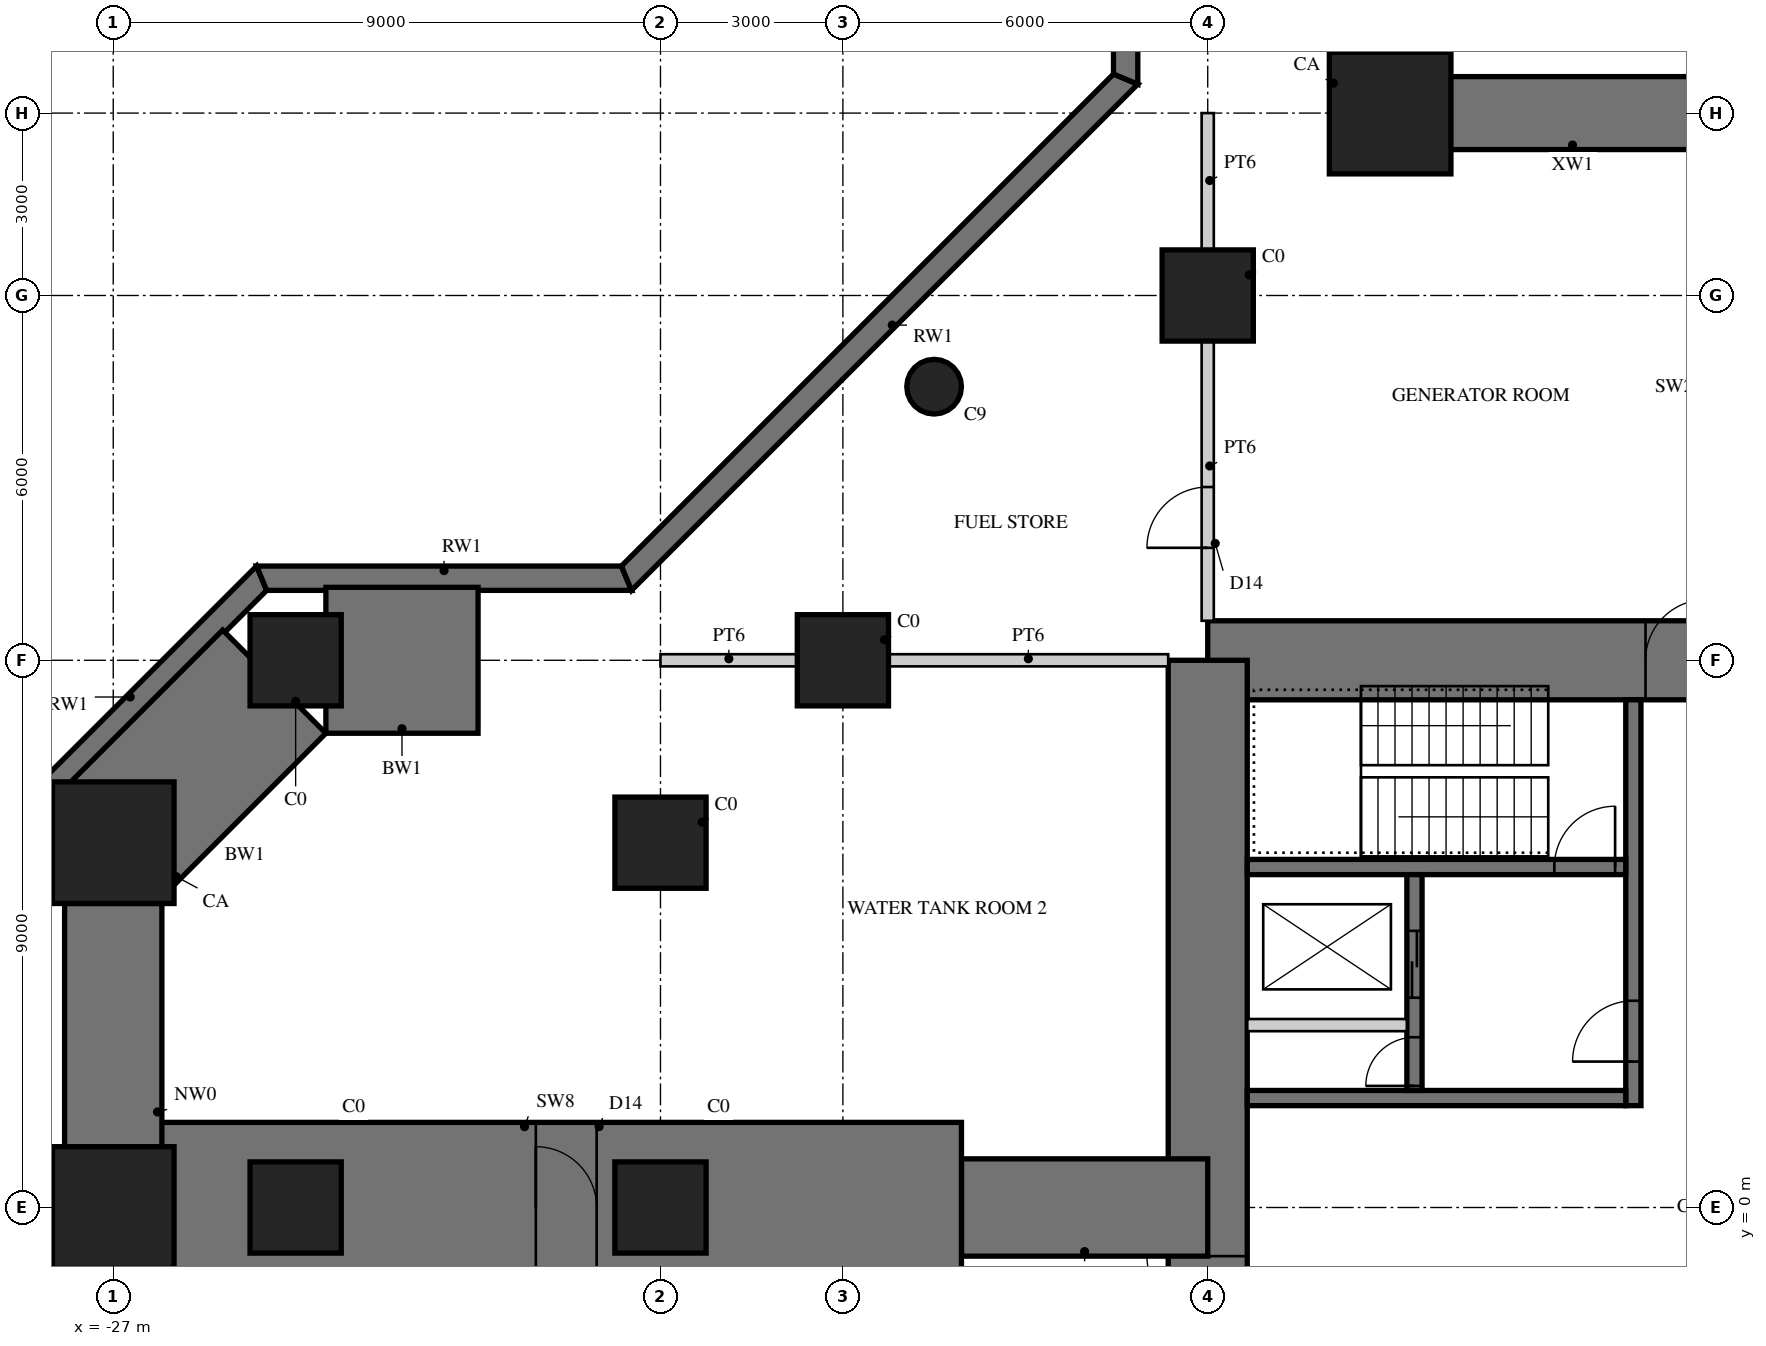
"""IFC4 building model, lengths in metres.
Left out: names, types, materials, properties, quantities, classifications, styles, units other than length and angle.
Written with IfcOpenShell. Run it as: python <this file> out.ifc"""

import sys

from ifc_helpers import new_model, si_unit, direction, frame, frame_2d, origin, origin_2d, place, context, subcontext, project, spatial, polyline, rectangle, circle, outline, extrude, element, fill, save


model = new_model("IFC4")
c1 = context("Model", 3, precision=1e-05, world=origin(), true_north=direction((0.0, 1.0)))
c2 = subcontext(c1, "Body", "Model", "MODEL_VIEW")
j1 = project(units=[si_unit("LENGTHUNIT", "METRE"), si_unit("PLANEANGLEUNIT", "RADIAN")], contexts=[c1])
p1 = place(None, origin())
s1 = spatial("IfcSite", under=j1, at=p1, CompositionType="ELEMENT")
p2 = place(p1, origin())
s2 = spatial("IfcBuilding", under=s1, at=p2, CompositionType="ELEMENT")
p3 = place(p2, frame((0.0, 0.0, -8.0)))
s3 = spatial("IfcBuildingStorey", under=s2, at=p3, CompositionType="ELEMENT", Elevation=-8.0)
p4 = place(p3, origin())
e1 = element("IfcWall", 1, at=p4, inside=s3, PredefinedType="SOLIDWALL", context=c2, shape_type="SweptSolid", body=[
    extrude(outline(polyline([(-28.15, 6.476), (-28.55, 6.642), (-24.642, 10.55), (-24.476, 10.15), (-28.15, 6.476)])), origin(), (0.0, 0.0, 1.0), 4.0),
])
p5 = place(p3, origin())
e2 = element("IfcWall", 2, at=p5, inside=s3, PredefinedType="SOLIDWALL", context=c2, shape_type="SweptSolid", body=[
    extrude(outline(polyline([(-24.476, 10.15), (-24.642, 10.55), (-18.642, 10.55), (-18.476, 10.15), (-24.476, 10.15)])), origin(), (0.0, 0.0, 1.0), 4.0),
])
p6 = place(p3, origin())
e3 = element("IfcWall", 3, at=p6, inside=s3, PredefinedType="SOLIDWALL", context=c2, shape_type="SweptSolid", body=[
    extrude(outline(polyline([(-18.476, 10.15), (-18.642, 10.55), (-10.55, 18.642), (-10.15, 18.476), (-18.476, 10.15)])), origin(), (0.0, 0.0, 1.0), 4.0),
])
p7 = place(p3, origin())
e4 = element("IfcWall", 4, at=p7, inside=s3, PredefinedType="SOLIDWALL", context=c2, shape_type="SweptSolid", body=[
    extrude(outline(polyline([(-10.15, 18.476), (-10.55, 18.642), (-10.55, 24.642), (-10.15, 24.476), (-10.15, 18.476)])), origin(), (0.0, 0.0, 1.0), 4.0),
])
p8 = place(p3, frame((9.0, 9.0, 0.0), z_axis=(0.0, 0.0, 1.0), x_axis=(-1.0, 0.0, 0.0)))
e5 = element("IfcWall", 5, at=p8, inside=s3, PredefinedType="SHEAR", context=c2, shape_type="SweptSolid", body=[
    extrude(rectangle(XDim=18.0, YDim=1.3, at=frame_2d((9.0, 0.0))), origin(), (0.0, 0.0, 1.0), 4.0),
])
p9 = place(p8, frame((9.8, 0.0, 0.0)))
e6 = element("IfcOpeningElement", 6, at=p9, cuts=e5, PredefinedType="OPENING", context=c2, shape_type="SweptSolid", body=[
    extrude(rectangle(XDim=1.0, YDim=2.4, at=frame_2d((0.5, 1.2))), frame((0.0, 0.66, 0.0), z_axis=(0.0, -1.0, 0.0), x_axis=(1.0, 0.0, 0.0)), (0.0, 0.0, 1.0), 1.32),
])
p10 = place(p3, frame((-9.0, 9.0, 0.0), z_axis=(0.0, 0.0, 1.0), x_axis=(0.0, -1.0, 0.0)))
e7 = element("IfcWall", 7, at=p10, inside=s3, PredefinedType="SHEAR", context=c2, shape_type="SweptSolid", body=[
    extrude(rectangle(XDim=18.0, YDim=1.3, at=frame_2d((9.0, 0.0))), origin(), (0.0, 0.0, 1.0), 4.0),
])
p11 = place(p10, frame((9.8, 0.0, 0.0)))
e8 = element("IfcOpeningElement", 8, at=p11, cuts=e7, PredefinedType="OPENING", context=c2, shape_type="SweptSolid", body=[
    extrude(rectangle(XDim=1.0, YDim=2.4, at=frame_2d((0.5, 1.2))), frame((0.0, 0.66, 0.0), z_axis=(0.0, -1.0, 0.0), x_axis=(1.0, 0.0, 0.0)), (0.0, 0.0, 1.0), 1.32),
])
p12 = place(p3, frame((-2.0, 1.675, 0.0), z_axis=(0.0, 0.0, 1.0), x_axis=(0.0, 1.0, 0.0)))
e9 = element("IfcWall", 9, at=p12, inside=s3, PredefinedType="SHEAR", context=c2, shape_type="SweptSolid", body=[
    extrude(rectangle(XDim=6.675, YDim=0.25, at=frame_2d((3.337, 0.0))), origin(), (0.0, 0.0, 1.0), 4.0),
])
p13 = place(p12, frame((0.725, 0.0, 0.0)))
e10 = element("IfcOpeningElement", 10, at=p13, cuts=e9, PredefinedType="OPENING", context=c2, shape_type="SweptSolid", body=[
    extrude(rectangle(XDim=1.0, YDim=2.1, at=frame_2d((0.5, 1.05))), frame((0.0, 0.135, 0.0), z_axis=(0.0, -1.0, 0.0), x_axis=(1.0, 0.0, 0.0)), (0.0, 0.0, 1.0), 0.27),
])
p14 = place(p3, frame((-2.125, 1.8, 0.0), z_axis=(0.0, 0.0, 1.0), x_axis=(-1.0, 0.0, 0.0)))
e11 = element("IfcWall", 11, at=p14, inside=s3, PredefinedType="SHEAR", context=c2, shape_type="SweptSolid", body=[
    extrude(rectangle(XDim=6.225, YDim=0.25, at=frame_2d((3.113, 0.0))), origin(), (0.0, 0.0, 1.0), 4.0),
])
p15 = place(p3, frame((-2.125, 5.6, 0.0), z_axis=(0.0, 0.0, 1.0), x_axis=(-1.0, 0.0, 0.0)))
e12 = element("IfcWall", 12, at=p15, inside=s3, PredefinedType="SHEAR", context=c2, shape_type="SweptSolid", body=[
    extrude(rectangle(XDim=6.225, YDim=0.25, at=frame_2d((3.113, 0.0))), origin(), (0.0, 0.0, 1.0), 4.0),
])
p16 = place(p15, frame((0.175, 0.0, 0.0)))
e13 = element("IfcOpeningElement", 13, at=p16, cuts=e12, PredefinedType="OPENING", context=c2, shape_type="SweptSolid", body=[
    extrude(rectangle(XDim=1.0, YDim=2.1, at=frame_2d((0.5, 1.05))), frame((0.0, 0.135, 0.0), z_axis=(0.0, -1.0, 0.0), x_axis=(1.0, 0.0, 0.0)), (0.0, 0.0, 1.0), 0.27),
])
p17 = place(p3, frame((-5.6, 1.925, 0.0), z_axis=(0.0, 0.0, 1.0), x_axis=(0.0, 1.0, 0.0)))
e14 = element("IfcWall", 14, at=p17, inside=s3, PredefinedType="SHEAR", context=c2, shape_type="SweptSolid", body=[
    extrude(rectangle(XDim=3.55, YDim=0.25, at=frame_2d((1.775, 0.0))), origin(), (0.0, 0.0, 1.0), 4.0),
])
p18 = place(p17, frame((1.525, 0.0, 0.0)))
e15 = element("IfcOpeningElement", 15, at=p18, cuts=e14, PredefinedType="OPENING", context=c2, shape_type="SweptSolid", body=[
    extrude(rectangle(XDim=1.1, YDim=2.2, at=frame_2d((0.55, 1.1))), frame((0.0, 0.135, 0.0), z_axis=(0.0, -1.0, 0.0), x_axis=(1.0, 0.0, 0.0)), (0.0, 0.0, 1.0), 0.27),
])
p19 = place(p17, frame((0.075, 0.0, 0.0)))
e16 = element("IfcOpeningElement", 16, at=p19, cuts=e14, PredefinedType="OPENING", context=c2, shape_type="SweptSolid", body=[
    extrude(rectangle(XDim=0.8, YDim=2.1, at=frame_2d((0.4, 1.05))), frame((0.0, 0.135, 0.0), z_axis=(0.0, -1.0, 0.0), x_axis=(1.0, 0.0, 0.0)), (0.0, 0.0, 1.0), 0.27),
])
p20 = place(p3, frame((-5.725, 3.0, 0.0), z_axis=(0.0, 0.0, 1.0), x_axis=(-1.0, 0.0, 0.0)))
e17 = element("IfcWall", 17, at=p20, inside=s3, PredefinedType="PARTITIONING", context=c2, shape_type="SweptSolid", body=[
    extrude(rectangle(XDim=2.625, YDim=0.2, at=frame_2d((1.312, 0.0))), origin(), (0.0, 0.0, 1.0), 4.0),
])
p21 = place(p3, frame((0.0, 18.0, 0.0), z_axis=(0.0, 0.0, 1.0), x_axis=(-1.0, 0.0, 0.0)))
e18 = element("IfcWall", 18, at=p21, inside=s3, PredefinedType="SHEAR", context=c2, shape_type="SweptSolid", body=[
    extrude(rectangle(XDim=6.0, YDim=1.2, at=frame_2d((3.0, 0.0))), origin(), (0.0, 0.0, 1.0), 4.0),
])
p22 = place(p3, frame((-9.0, 0.0, 0.0), z_axis=(0.0, 0.0, 1.0), x_axis=(-1.0, 0.0, 0.0)))
e19 = element("IfcWall", 19, at=p22, inside=s3, PredefinedType="SHEAR", context=c2, shape_type="SweptSolid", body=[
    extrude(rectangle(XDim=4.05, YDim=1.6, at=frame_2d((2.025, 0.0))), origin(), (0.0, 0.0, 1.0), 4.0),
])
p23 = place(p3, frame((-13.05, 0.0, 0.0), z_axis=(0.0, 0.0, 1.0), x_axis=(-1.0, 0.0, 0.0)))
e20 = element("IfcWall", 20, at=p23, inside=s3, PredefinedType="SHEAR", context=c2, shape_type="SweptSolid", body=[
    extrude(rectangle(XDim=13.95, YDim=2.8, at=frame_2d((6.975, 0.0))), origin(), (0.0, 0.0, 1.0), 4.0),
])
p24 = place(p23, frame((6.0, 0.0, 0.0)))
e21 = element("IfcOpeningElement", 21, at=p24, cuts=e20, PredefinedType="OPENING", context=c2, shape_type="SweptSolid", body=[
    extrude(rectangle(XDim=1.0, YDim=2.2, at=frame_2d((0.5, 1.1))), frame((0.0, 1.41, 0.0), z_axis=(0.0, -1.0, 0.0), x_axis=(1.0, 0.0, 0.0)), (0.0, 0.0, 1.0), 2.82),
])
p25 = place(p3, frame((-21.0, 9.0, 0.0), z_axis=(0.0, 0.0, 1.0), x_axis=(-1.0, 0.0, 0.0)))
e22 = element("IfcWall", 22, at=p25, inside=s3, PredefinedType="SHEAR", context=c2, shape_type="SweptSolid", body=[
    extrude(rectangle(XDim=2.503, YDim=2.4, at=frame_2d((1.251, 0.0))), origin(), (0.0, 0.0, 1.0), 4.0),
])
p26 = place(p3, frame((-24.352, 8.648, 0.0), z_axis=(0.0, 0.0, 1.0), x_axis=(-0.707106781187, -0.707106781187, 0.0)))
e23 = element("IfcWall", 23, at=p26, inside=s3, PredefinedType="SHEAR", context=c2, shape_type="SweptSolid", body=[
    extrude(rectangle(XDim=3.745, YDim=2.4, at=frame_2d((1.873, 0.0))), origin(), (0.0, 0.0, 1.0), 4.0),
])
p27 = place(p3, frame((-27.0, 5.0, 0.0), z_axis=(0.0, 0.0, 1.0), x_axis=(0.0, -1.0, 0.0)))
e24 = element("IfcWall", 24, at=p27, inside=s3, PredefinedType="SHEAR", context=c2, shape_type="SweptSolid", body=[
    extrude(rectangle(XDim=10.0, YDim=1.6, at=frame_2d((5.0, 0.0))), origin(), (0.0, 0.0, 1.0), 4.0),
])
for number, where, z_axis, x_axis in (
    (25, (-9.0, 15.0, 0.0), (0.0, 0.0, 1.0), (1.0, 0.0, 0.0)),
    (26, (-15.0, 9.0, 0.0), (0.0, 0.0, 1.0), (1.0, 0.0, 0.0)),
    (27, (-24.0, 9.0, 0.0), (0.0, 0.0, 1.0), (1.0, 0.0, 0.0)),
):
    element("IfcColumn", number, at=place(p3, frame(where, z_axis=z_axis, x_axis=x_axis)), inside=s3, PredefinedType="COLUMN", context=c2, shape_type="SweptSolid", body=[
        extrude(rectangle(XDim=1.5, YDim=1.5, at=origin_2d()), origin(), (0.0, 0.0, 1.0), 4.0),
    ])
for number, where, z_axis, x_axis in (
    (28, (-27.0, 6.0, 0.0), (0.0, 0.0, 1.0), (1.0, 0.0, 0.0)),
    (29, (-27.0, 0.0, 0.0), (0.0, 0.0, 1.0), (1.0, 0.0, 0.0)),
    (30, (-6.0, 18.0, 0.0), (0.0, 0.0, 1.0), (1.0, 0.0, 0.0)),
):
    element("IfcColumn", number, at=place(p3, frame(where, z_axis=z_axis, x_axis=x_axis)), inside=s3, PredefinedType="COLUMN", context=c2, shape_type="SweptSolid", body=[
        extrude(rectangle(XDim=2.0, YDim=2.0, at=origin_2d()), origin(), (0.0, 0.0, 1.0), 4.0),
    ])
for number, where, z_axis, x_axis in (
    (31, (-18.0, 6.0, 0.0), (0.0, 0.0, 1.0), (1.0, 0.0, 0.0)),
    (32, (-18.0, 0.0, 0.0), (0.0, 0.0, 1.0), (1.0, 0.0, 0.0)),
    (33, (-24.0, 0.0, 0.0), (0.0, 0.0, 1.0), (1.0, 0.0, 0.0)),
):
    element("IfcColumn", number, at=place(p3, frame(where, z_axis=z_axis, x_axis=x_axis)), inside=s3, PredefinedType="COLUMN", context=c2, shape_type="SweptSolid", body=[
        extrude(rectangle(XDim=1.5, YDim=1.5, at=origin_2d()), origin(), (0.0, 0.0, 1.0), 4.0),
    ])
p28 = place(p3, frame((-13.5, 13.5, 0.0), z_axis=(0.0, 0.0, 1.0), x_axis=(1.0, 0.0, 0.0)))
e34 = element("IfcColumn", 34, at=p28, inside=s3, PredefinedType="COLUMN", context=c2, shape_type="SweptSolid", body=[
    extrude(circle(Radius=0.45, at=origin_2d()), origin(), (0.0, 0.0, 1.0), 4.0),
])
p29 = place(p3, frame((-9.0, 9.65, 0.0), z_axis=(0.0, 0.0, 1.0), x_axis=(0.0, 1.0, 0.0)))
e35 = element("IfcWall", 35, at=p29, inside=s3, PredefinedType="SOLIDWALL", context=c2, shape_type="SweptSolid", body=[
    extrude(rectangle(XDim=4.6, YDim=0.2, at=frame_2d((2.3, 0.0))), origin(), (0.0, 0.0, 1.0), 2.75),
])
p30 = place(p29, frame((1.2, 0.0, 0.0)))
e36 = element("IfcOpeningElement", 36, at=p30, cuts=e35, PredefinedType="OPENING", context=c2, shape_type="SweptSolid", body=[
    extrude(rectangle(XDim=1.0, YDim=2.2, at=frame_2d((0.5, 1.1))), frame((0.0, 0.11, 0.0), z_axis=(0.0, -1.0, 0.0), x_axis=(1.0, 0.0, 0.0)), (0.0, 0.0, 1.0), 0.22),
])
p31 = place(p3, frame((-9.0, 15.75, 0.0), z_axis=(0.0, 0.0, 1.0), x_axis=(0.0, 1.0, 0.0)))
e37 = element("IfcWall", 37, at=p31, inside=s3, PredefinedType="SOLIDWALL", context=c2, shape_type="SweptSolid", body=[
    extrude(rectangle(XDim=2.25, YDim=0.2, at=frame_2d((1.125, 0.0))), origin(), (0.0, 0.0, 1.0), 2.75),
])
p32 = place(p3, frame((-14.25, 9.0, 0.0), z_axis=(0.0, 0.0, 1.0), x_axis=(1.0, 0.0, 0.0)))
e38 = element("IfcWall", 38, at=p32, inside=s3, PredefinedType="SOLIDWALL", context=c2, shape_type="SweptSolid", body=[
    extrude(rectangle(XDim=4.6, YDim=0.2, at=frame_2d((2.3, 0.0))), origin(), (0.0, 0.0, 1.0), 2.75),
])
p33 = place(p3, frame((-18.0, 9.0, 0.0), z_axis=(0.0, 0.0, 1.0), x_axis=(1.0, 0.0, 0.0)))
e39 = element("IfcWall", 39, at=p33, inside=s3, PredefinedType="SOLIDWALL", context=c2, shape_type="SweptSolid", body=[
    extrude(rectangle(XDim=2.25, YDim=0.2, at=frame_2d((1.125, 0.0))), origin(), (0.0, 0.0, 1.0), 2.75),
])
p34 = place(p30, origin())
e40 = element("IfcDoor", 40, at=p34, inside=s3, OperationType="SINGLE_SWING_LEFT", PredefinedType="DOOR", context=c2, shape_type="SweptSolid", body=[
    extrude(rectangle(XDim=1.0, YDim=2.2, at=frame_2d((0.5, 1.1))), frame((0.0, 0.025, 0.0), z_axis=(0.0, -1.0, 0.0), x_axis=(1.0, 0.0, 0.0)), (0.0, 0.0, 1.0), 0.05),
])
fill(e36, e40)
p35 = place(p24, frame((1.0, 0.0, 0.0), z_axis=(0.0, 0.0, 1.0), x_axis=(-1.0, 0.0, 0.0)))
e41 = element("IfcDoor", 41, at=p35, inside=s3, OperationType="SINGLE_SWING_LEFT", PredefinedType="DOOR", context=c2, shape_type="SweptSolid", body=[
    extrude(rectangle(XDim=1.0, YDim=2.2, at=frame_2d((0.5, 1.1))), frame((0.0, 0.025, 0.0), z_axis=(0.0, -1.0, 0.0), x_axis=(1.0, 0.0, 0.0)), (0.0, 0.0, 1.0), 0.05),
])
fill(e21, e41)
p36 = place(p9, frame((1.0, 0.0, 0.0), z_axis=(0.0, 0.0, 1.0), x_axis=(-1.0, 0.0, 0.0)))
e42 = element("IfcDoor", 42, at=p36, inside=s3, OperationType="SINGLE_SWING_RIGHT", PredefinedType="DOOR", context=c2, shape_type="SweptSolid", body=[
    extrude(rectangle(XDim=1.0, YDim=2.4, at=frame_2d((0.5, 1.2))), frame((0.0, -0.005, 0.0), z_axis=(0.0, -1.0, 0.0), x_axis=(1.0, 0.0, 0.0)), (0.0, 0.0, 1.0), 0.05),
])
fill(e6, e42)
p37 = place(p11, frame((1.0, 0.0, 0.0), z_axis=(0.0, 0.0, 1.0), x_axis=(-1.0, 0.0, 0.0)))
e43 = element("IfcDoor", 43, at=p37, inside=s3, OperationType="SINGLE_SWING_RIGHT", PredefinedType="DOOR", context=c2, shape_type="SweptSolid", body=[
    extrude(rectangle(XDim=1.0, YDim=2.4, at=frame_2d((0.5, 1.2))), frame((0.0, -0.005, 0.0), z_axis=(0.0, -1.0, 0.0), x_axis=(1.0, 0.0, 0.0)), (0.0, 0.0, 1.0), 0.05),
])
fill(e8, e43)
p38 = place(p13, origin())
e44 = element("IfcDoor", 44, at=p38, inside=s3, OperationType="SINGLE_SWING_LEFT", PredefinedType="DOOR", context=c2, shape_type="SweptSolid", body=[
    extrude(rectangle(XDim=1.0, YDim=2.1, at=frame_2d((0.5, 1.05))), frame((0.0, 0.025, 0.0), z_axis=(0.0, -1.0, 0.0), x_axis=(1.0, 0.0, 0.0)), (0.0, 0.0, 1.0), 0.05),
])
fill(e10, e44)
p39 = place(p16, frame((1.0, 0.0, 0.0), z_axis=(0.0, 0.0, 1.0), x_axis=(-1.0, 0.0, 0.0)))
e45 = element("IfcDoor", 45, at=p39, inside=s3, OperationType="SINGLE_SWING_RIGHT", PredefinedType="DOOR", context=c2, shape_type="SweptSolid", body=[
    extrude(rectangle(XDim=1.0, YDim=2.1, at=frame_2d((0.5, 1.05))), frame((0.0, 0.025, 0.0), z_axis=(0.0, -1.0, 0.0), x_axis=(1.0, 0.0, 0.0)), (0.0, 0.0, 1.0), 0.05),
])
fill(e13, e45)
p40 = place(p18, origin())
e46 = element("IfcDoor", 46, at=p40, inside=s3, OperationType="DOUBLE_DOOR_SLIDING", PredefinedType="DOOR", context=c2, shape_type="SweptSolid", body=[
    extrude(rectangle(XDim=1.1, YDim=2.2, at=frame_2d((0.55, 1.1))), frame((0.0, 0.025, 0.0), z_axis=(0.0, -1.0, 0.0), x_axis=(1.0, 0.0, 0.0)), (0.0, 0.0, 1.0), 0.05),
])
fill(e15, e46)
p41 = place(p19, origin())
e47 = element("IfcDoor", 47, at=p41, inside=s3, OperationType="SINGLE_SWING_LEFT", PredefinedType="DOOR", context=c2, shape_type="SweptSolid", body=[
    extrude(rectangle(XDim=0.8, YDim=2.1, at=frame_2d((0.4, 1.05))), frame((0.0, 0.025, 0.0), z_axis=(0.0, -1.0, 0.0), x_axis=(1.0, 0.0, 0.0)), (0.0, 0.0, 1.0), 0.05),
])
fill(e16, e47)
save(model, sys.argv[1])
